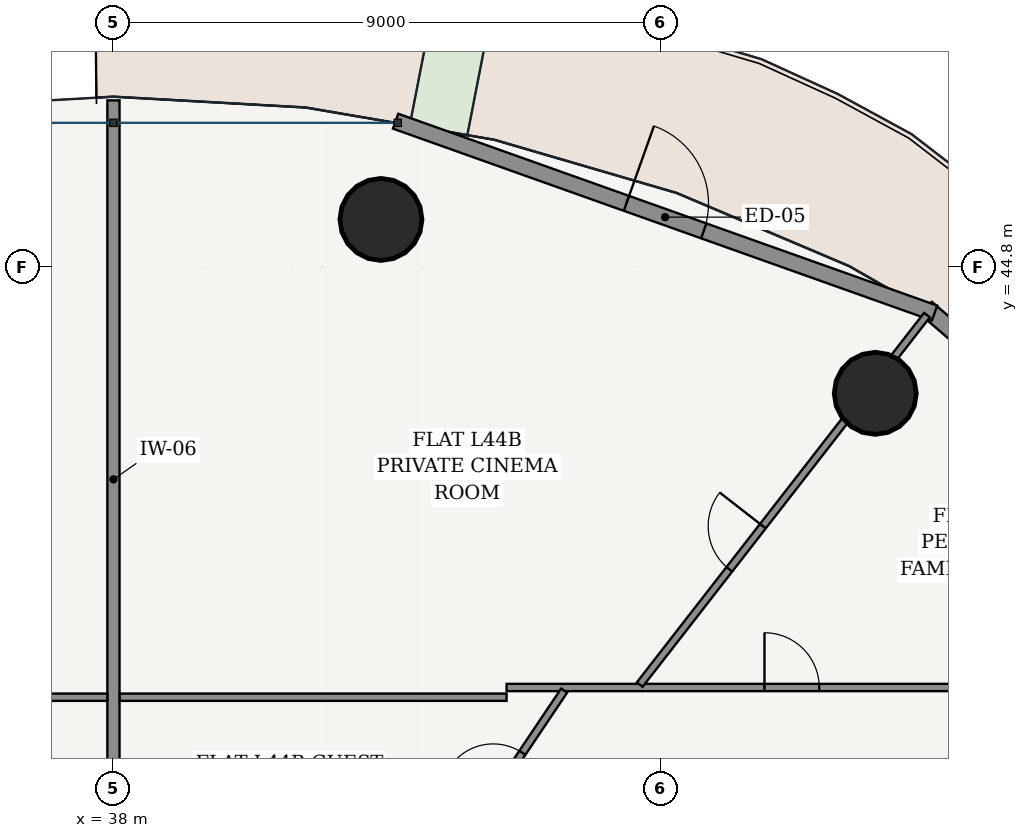
"""IFC4 building model, lengths in metres.
Left out: names, types, materials, properties, quantities, classifications, styles, units other than length and angle.
Written with IfcOpenShell. Run it as: python <this file> out.ifc"""

import sys

from ifc_helpers import new_model, si_unit, direction, frame, frame_2d, origin, origin_2d, place, context, subcontext, project, spatial, rectangle, hollow_circle, extrude, source, transform, mapped, element, fill, save


model = new_model("IFC4")
c1 = context("Model", 3, precision=1e-05, world=origin(), true_north=direction((-0.2419218956, 0.970295726276)))
c2 = subcontext(c1, "Body", "Model", "MODEL_VIEW")
j1 = project(units=[si_unit("LENGTHUNIT", "METRE"), si_unit("PLANEANGLEUNIT", "RADIAN")], contexts=[c1])
p1 = place(None, origin())
s1 = spatial("IfcSite", under=j1, at=p1, CompositionType="ELEMENT")
p2 = place(p1, origin())
s2 = spatial("IfcBuilding", under=s1, at=p2, CompositionType="ELEMENT")
p3 = place(p2, frame((0.0, 0.0, 167.8)))
s3 = spatial("IfcBuildingStorey", under=s2, at=p3, CompositionType="ELEMENT", Elevation=167.8)
for number, where, z_axis, x_axis in (
    (1, (50.528, 42.723, 0.0), (0.0, 0.0, 1.0), (1.0, 0.0, 0.0)),
    (2, (42.399, 45.582, 0.0), (0.0, 0.0, 1.0), (1.0, 0.0, 0.0)),
):
    element("IfcColumn", number, at=place(p3, frame(where, z_axis=z_axis, x_axis=x_axis)), inside=s3, PredefinedType="COLUMN", context=c2, shape_type="SweptSolid", body=[
        extrude(hollow_circle(Radius=0.675, WallThickness=0.042, at=origin_2d()), origin(), (0.0, 0.0, 1.0), 3.6),
    ])
p4 = place(p3, frame((58.157, 38.287, 0.0), z_axis=(0.0, 0.0, 1.0), x_axis=(-0.75843401647, 0.651749831348, 0.0)))
e3 = element("IfcWall", 3, at=p4, inside=s3, PredefinedType="SOLIDWALL", context=c2, shape_type="SweptSolid", body=[
    extrude(rectangle(XDim=8.952, YDim=0.28, at=frame_2d((4.476, 0.0))), origin(), (0.0, 0.0, 1.0), 3.33),
])
p5 = place(p4, frame((1.367, 0.0, 0.85)))
e4 = element("IfcOpeningElement", 4, at=p5, cuts=e3, PredefinedType="OPENING", context=c2, shape_type="SweptSolid", body=[
    extrude(rectangle(XDim=2.1, YDim=1.95, at=frame_2d((1.05, 0.975))), frame((0.0, 0.15, 0.0), z_axis=(0.0, -1.0, 0.0), x_axis=(1.0, 0.0, 0.0)), (0.0, 0.0, 1.0), 0.3),
])
p6 = place(p4, frame((5.485, 0.0, 0.85)))
e5 = element("IfcOpeningElement", 5, at=p6, cuts=e3, PredefinedType="OPENING", context=c2, shape_type="SweptSolid", body=[
    extrude(rectangle(XDim=2.1, YDim=1.95, at=frame_2d((1.05, 0.975))), frame((0.0, 0.15, 0.0), z_axis=(0.0, -1.0, 0.0), x_axis=(1.0, 0.0, 0.0)), (0.0, 0.0, 1.0), 0.3),
])
p7 = place(p3, frame((51.503, 44.043, 0.0), z_axis=(0.0, 0.0, 1.0), x_axis=(-0.942095406405, 0.335344964522, 0.0)))
e6 = element("IfcWall", 6, at=p7, inside=s3, PredefinedType="SOLIDWALL", context=c2, shape_type="SweptSolid", body=[
    extrude(rectangle(XDim=9.408, YDim=0.26, at=frame_2d((4.704, 0.0))), origin(), (0.0, 0.0, 1.0), 3.33),
])
p8 = place(p7, frame((4.029, 0.0, 0.0)))
e7 = element("IfcOpeningElement", 7, at=p8, cuts=e6, PredefinedType="OPENING", context=c2, shape_type="SweptSolid", body=[
    extrude(rectangle(XDim=1.35, YDim=2.2, at=frame_2d((0.675, 1.1))), frame((0.0, 0.14, 0.0), z_axis=(0.0, -1.0, 0.0), x_axis=(1.0, 0.0, 0.0)), (0.0, 0.0, 1.0), 0.28),
])
p9 = place(p3, frame((38.0, 35.075, 0.0), z_axis=(0.0, 0.0, 1.0), x_axis=(0.0, 1.0, 0.0)))
e8 = element("IfcWall", 8, at=p9, inside=s3, PredefinedType="PARTITIONING", context=c2, shape_type="SweptSolid", body=[
    extrude(rectangle(XDim=12.465, YDim=0.2, at=frame_2d((6.232, 0.0))), origin(), (0.0, 0.0, 1.0), 2.415),
])
for number, where, z_axis, x_axis in (
    (9, (31.535, 37.725, 0.0), (0.0, 0.0, 1.0), (1.0, 0.0, 0.0)),
    (10, (38.102, 37.725, 0.0), (0.0, 0.0, 1.0), (1.0, 0.0, 0.0)),
):
    element("IfcWall", number, at=place(p3, frame(where, z_axis=z_axis, x_axis=x_axis)), inside=s3, PredefinedType="PARTITIONING", context=c2, shape_type="SweptSolid", body=[
        extrude(rectangle(XDim=6.363, YDim=0.12, at=frame_2d((3.182, 0.0))), origin(), (0.0, 0.0, 1.0), 2.776),
    ])
p10 = place(p3, frame((44.465, 37.885, 0.0), z_axis=(0.0, 0.0, 1.0), x_axis=(1.0, 0.0, 0.0)))
e11 = element("IfcWall", 11, at=p10, inside=s3, PredefinedType="PARTITIONING", context=c2, shape_type="SweptSolid", body=[
    extrude(rectangle(XDim=7.47, YDim=0.12, at=frame_2d((3.735, 0.0))), origin(), (0.0, 0.0, 1.0), 2.776),
])
p11 = place(p10, frame((4.241, 0.0, 0.0)))
e12 = element("IfcOpeningElement", 12, at=p11, cuts=e11, PredefinedType="OPENING", context=c2, shape_type="SweptSolid", body=[
    extrude(rectangle(XDim=0.9, YDim=2.15, at=frame_2d((0.45, 1.075))), frame((0.0, 0.07, 0.0), z_axis=(0.0, -1.0, 0.0), x_axis=(1.0, 0.0, 0.0)), (0.0, 0.0, 1.0), 0.14),
])
p12 = place(p3, frame((46.656, 37.934, 0.0), z_axis=(0.0, 0.0, 1.0), x_axis=(0.613758289074, 0.789493991487, 0.0)))
e13 = element("IfcWall", 13, at=p12, inside=s3, PredefinedType="PARTITIONING", context=c2, shape_type="SweptSolid", body=[
    extrude(rectangle(XDim=7.695, YDim=0.12, at=frame_2d((3.848, 0.0))), origin(), (0.0, 0.0, 1.0), 2.776),
])
p13 = place(p12, frame((2.399, 0.0, 0.0)))
e14 = element("IfcOpeningElement", 14, at=p13, cuts=e13, PredefinedType="OPENING", context=c2, shape_type="SweptSolid", body=[
    extrude(rectangle(XDim=0.9, YDim=2.15, at=frame_2d((0.45, 1.075))), frame((0.0, 0.07, 0.0), z_axis=(0.0, -1.0, 0.0), x_axis=(1.0, 0.0, 0.0)), (0.0, 0.0, 1.0), 0.14),
])
p14 = place(p3, frame((43.559, 35.075, 0.0), z_axis=(0.0, 0.0, 1.0), x_axis=(0.557612855606, 0.830101140381, 0.0)))
e15 = element("IfcWall", 15, at=p14, inside=s3, PredefinedType="PARTITIONING", context=c2, shape_type="SweptSolid", body=[
    extrude(rectangle(XDim=3.323, YDim=0.12, at=frame_2d((1.662, 0.0))), origin(), (0.0, 0.0, 1.0), 3.33),
])
p15 = place(p14, frame((1.232, 0.0, 0.0)))
e16 = element("IfcOpeningElement", 16, at=p15, cuts=e15, PredefinedType="OPENING", context=c2, shape_type="SweptSolid", body=[
    extrude(rectangle(XDim=0.86, YDim=2.15, at=frame_2d((0.43, 1.075))), frame((0.0, 0.07, 0.0), z_axis=(0.0, -1.0, 0.0), x_axis=(1.0, 0.0, 0.0)), (0.0, 0.0, 1.0), 0.14),
])
m1 = source(origin(), c2, "Body", "SweptSolid", [
    extrude(rectangle(XDim=1.35, YDim=2.2, at=frame_2d((0.675, 1.1))), frame((0.0, 0.025, 0.0), z_axis=(0.0, -1.0, 0.0), x_axis=(1.0, 0.0, 0.0)), (0.0, 0.0, 1.0), 0.05),
])
p16 = place(p8, frame((1.35, 0.0, 0.0), z_axis=(0.0, 0.0, 1.0), x_axis=(-1.0, 0.0, 0.0)))
e17 = element("IfcDoor", 17, at=p16, inside=s3, OperationType="SINGLE_SWING_LEFT", PredefinedType="DOOR", context=c2, shape_type="MappedRepresentation", body=[
    mapped(m1, transform((0.0, 0.0, 0.0), scale=1.0)),
])
fill(e7, e17)
m2 = source(origin(), c2, "Body", "SweptSolid", [
    extrude(rectangle(XDim=0.86, YDim=2.15, at=frame_2d((0.43, 1.075))), frame((0.0, 0.025, 0.0), z_axis=(0.0, -1.0, 0.0), x_axis=(1.0, 0.0, 0.0)), (0.0, 0.0, 1.0), 0.05),
])
p17 = place(p15, origin())
e18 = element("IfcDoor", 18, at=p17, inside=s3, OperationType="SINGLE_SWING_LEFT", PredefinedType="DOOR", context=c2, shape_type="MappedRepresentation", body=[
    mapped(m2, transform((0.0, 0.0, 0.0), scale=1.0)),
])
fill(e16, e18)
m3 = source(origin(), c2, "Body", "SweptSolid", [
    extrude(rectangle(XDim=0.9, YDim=2.15, at=frame_2d((0.45, 1.075))), frame((0.0, 0.025, 0.0), z_axis=(0.0, -1.0, 0.0), x_axis=(1.0, 0.0, 0.0)), (0.0, 0.0, 1.0), 0.05),
])
p18 = place(p11, origin())
e19 = element("IfcDoor", 19, at=p18, inside=s3, OperationType="SINGLE_SWING_LEFT", PredefinedType="DOOR", context=c2, shape_type="MappedRepresentation", body=[
    mapped(m3, transform((0.0, 0.0, 0.0), scale=1.0)),
])
fill(e12, e19)
p19 = place(p13, origin())
e20 = element("IfcDoor", 20, at=p19, inside=s3, OperationType="SINGLE_SWING_RIGHT", PredefinedType="DOOR", context=c2, shape_type="MappedRepresentation", body=[
    mapped(m3, transform((0.0, 0.0, 0.0), scale=1.0)),
])
fill(e14, e20)
save(model, sys.argv[1])
